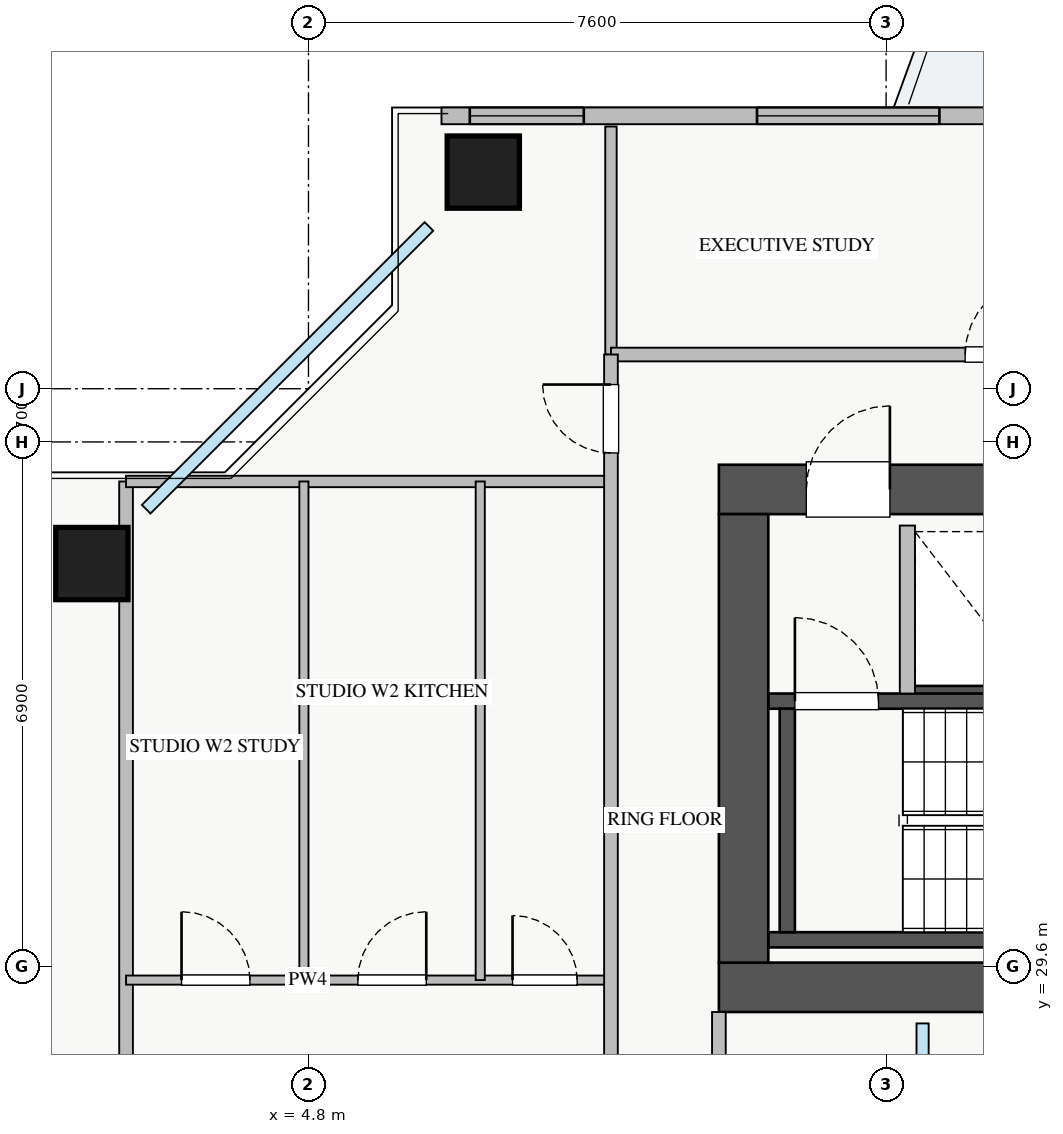
"""IFC4 building model, lengths in metres.
Left out: names, types, materials, properties, quantities, classifications, styles, units other than length and angle.
Written with IfcOpenShell. Run it as: python <this file> out.ifc"""

import sys

from ifc_helpers import new_model, si_unit, direction, frame, frame_2d, origin, origin_2d, place, context, subcontext, project, spatial, rectangle, extrude, source, transform, mapped, element, fill, save


model = new_model("IFC4")
c1 = context("Model", 3, precision=1e-05, world=origin(), true_north=direction((0.0, 1.0)))
c2 = subcontext(c1, "Body", "Model", "MODEL_VIEW")
j1 = project(units=[si_unit("LENGTHUNIT", "METRE"), si_unit("PLANEANGLEUNIT", "RADIAN")], contexts=[c1])
p1 = place(None, origin())
s1 = spatial("IfcSite", under=j1, at=p1, CompositionType="ELEMENT")
p2 = place(p1, origin())
s2 = spatial("IfcBuilding", under=s1, at=p2, CompositionType="ELEMENT")
p3 = place(p2, frame((0.0, 0.0, 173.0)))
s3 = spatial("IfcBuildingStorey", under=s2, at=p3, CompositionType="ELEMENT", Elevation=173.0)
p4 = place(p3, frame((12.68, 33.2, 0.0), z_axis=(0.0, 0.0, 1.0), x_axis=(1.0, 0.0, 0.0)))
e1 = element("IfcWall", 1, at=p4, inside=s3, PredefinedType="SHEAR", context=c2, shape_type="SweptSolid", body=[
    extrude(rectangle(XDim=1.94, YDim=0.18, at=frame_2d((0.97, 0.0))), origin(), (0.0, 0.0, 1.0), 3.0),
])
p5 = place(p3, frame((10.85, 29.95, 0.0), z_axis=(0.0, 0.0, 1.0), x_axis=(1.0, 0.0, 0.0)))
e2 = element("IfcWall", 2, at=p5, inside=s3, PredefinedType="SHEAR", context=c2, shape_type="SweptSolid", body=[
    extrude(rectangle(XDim=7.3, YDim=0.2, at=frame_2d((3.65, 0.0))), origin(), (0.0, 0.0, 1.0), 3.25),
])
p6 = place(p3, frame((10.85, 33.09, 0.0), z_axis=(0.0, 0.0, 1.0), x_axis=(1.0, 0.0, 0.0)))
e3 = element("IfcWall", 3, at=p6, inside=s3, PredefinedType="SHEAR", context=c2, shape_type="SweptSolid", body=[
    extrude(rectangle(XDim=7.3, YDim=0.2, at=frame_2d((3.65, 0.0))), origin(), (0.0, 0.0, 1.0), 3.25),
])
p7 = place(p6, frame((0.35, 0.0, 0.0)))
e4 = element("IfcOpeningElement", 4, at=p7, cuts=e3, PredefinedType="OPENING", context=c2, shape_type="SweptSolid", body=[
    extrude(rectangle(XDim=1.1, YDim=2.05, at=frame_2d((0.55, 1.025))), frame((0.0, 0.11, 0.0), z_axis=(0.0, -1.0, 0.0), x_axis=(1.0, 0.0, 0.0)), (0.0, 0.0, 1.0), 0.22),
])
p8 = place(p3, frame((11.1, 30.05, 0.0), z_axis=(0.0, 0.0, 1.0), x_axis=(0.0, 1.0, 0.0)))
e5 = element("IfcWall", 5, at=p8, inside=s3, PredefinedType="SHEAR", context=c2, shape_type="SweptSolid", body=[
    extrude(rectangle(XDim=2.94, YDim=0.2, at=frame_2d((1.47, 0.0))), origin(), (0.0, 0.0, 1.0), 3.25),
])
p9 = place(p3, frame((10.2, 29.325, 0.0), z_axis=(0.0, 0.0, 1.0), x_axis=(1.0, 0.0, 0.0)))
e6 = element("IfcWall", 6, at=p9, inside=s3, PredefinedType="SHEAR", context=c2, shape_type="SweptSolid", body=[
    extrude(rectangle(XDim=17.6, YDim=0.65, at=frame_2d((8.8, 0.0))), origin(), (0.0, 0.0, 1.0), 3.25),
])
p10 = place(p3, frame((10.2, 35.875, 0.0), z_axis=(0.0, 0.0, 1.0), x_axis=(1.0, 0.0, 0.0)))
e7 = element("IfcWall", 7, at=p10, inside=s3, PredefinedType="SHEAR", context=c2, shape_type="SweptSolid", body=[
    extrude(rectangle(XDim=17.6, YDim=0.65, at=frame_2d((8.8, 0.0))), origin(), (0.0, 0.0, 1.0), 3.25),
])
p11 = place(p10, frame((1.15, 0.0, 0.0)))
e8 = element("IfcOpeningElement", 8, at=p11, cuts=e7, PredefinedType="OPENING", context=c2, shape_type="SweptSolid", body=[
    extrude(rectangle(XDim=1.1, YDim=2.05, at=frame_2d((0.55, 1.025))), frame((0.0, 0.335, 0.0), z_axis=(0.0, -1.0, 0.0), x_axis=(1.0, 0.0, 0.0)), (0.0, 0.0, 1.0), 0.67),
])
p12 = place(p10, frame((8.3, 0.0, 0.0)))
e9 = element("IfcOpeningElement", 9, at=p12, cuts=e7, PredefinedType="OPENING", context=c2, shape_type="SweptSolid", body=[
    extrude(rectangle(XDim=1.1, YDim=2.05, at=frame_2d((0.55, 1.025))), frame((0.0, 0.335, 0.0), z_axis=(0.0, -1.0, 0.0), x_axis=(1.0, 0.0, 0.0)), (0.0, 0.0, 1.0), 0.67),
])
p13 = place(p10, frame((4.9, 0.0, 0.0)))
e10 = element("IfcOpeningElement", 10, at=p13, cuts=e7, PredefinedType="OPENING", context=c2, shape_type="SweptSolid", body=[
    extrude(rectangle(XDim=1.1, YDim=2.05, at=frame_2d((0.55, 1.025))), frame((0.0, 0.335, 0.0), z_axis=(0.0, -1.0, 0.0), x_axis=(1.0, 0.0, 0.0)), (0.0, 0.0, 1.0), 0.67),
])
p14 = place(p10, frame((14.74, 0.0, 0.0)))
e11 = element("IfcOpeningElement", 11, at=p14, cuts=e7, PredefinedType="OPENING", context=c2, shape_type="SweptSolid", body=[
    extrude(rectangle(XDim=1.0, YDim=2.05, at=frame_2d((0.5, 1.025))), frame((0.0, 0.335, 0.0), z_axis=(0.0, -1.0, 0.0), x_axis=(1.0, 0.0, 0.0)), (0.0, 0.0, 1.0), 0.67),
])
p15 = place(p10, frame((10.005, 0.0, 0.0)))
e12 = element("IfcOpeningElement", 12, at=p15, cuts=e7, PredefinedType="OPENING", context=c2, shape_type="SweptSolid", body=[
    extrude(rectangle(XDim=1.0, YDim=2.05, at=frame_2d((0.5, 1.025))), frame((0.0, 0.335, 0.0), z_axis=(0.0, -1.0, 0.0), x_axis=(1.0, 0.0, 0.0)), (0.0, 0.0, 1.0), 0.67),
])
p16 = place(p10, frame((11.55, 0.0, 0.0)))
e13 = element("IfcOpeningElement", 13, at=p16, cuts=e7, PredefinedType="OPENING", context=c2, shape_type="SweptSolid", body=[
    extrude(rectangle(XDim=1.0, YDim=2.05, at=frame_2d((0.5, 1.025))), frame((0.0, 0.335, 0.0), z_axis=(0.0, -1.0, 0.0), x_axis=(1.0, 0.0, 0.0)), (0.0, 0.0, 1.0), 0.67),
])
p17 = place(p10, frame((13.215, 0.0, 0.0)))
e14 = element("IfcOpeningElement", 14, at=p17, cuts=e7, PredefinedType="OPENING", context=c2, shape_type="SweptSolid", body=[
    extrude(rectangle(XDim=1.0, YDim=2.05, at=frame_2d((0.5, 1.025))), frame((0.0, 0.335, 0.0), z_axis=(0.0, -1.0, 0.0), x_axis=(1.0, 0.0, 0.0)), (0.0, 0.0, 1.0), 0.67),
])
p18 = place(p3, frame((10.525, 29.65, 0.0), z_axis=(0.0, 0.0, 1.0), x_axis=(0.0, 1.0, 0.0)))
e15 = element("IfcWall", 15, at=p18, inside=s3, PredefinedType="SHEAR", context=c2, shape_type="SweptSolid", body=[
    extrude(rectangle(XDim=5.9, YDim=0.65, at=frame_2d((2.95, 0.0))), origin(), (0.0, 0.0, 1.0), 3.25),
])
m1 = source(origin(), c2, "Body", "SweptSolid", [
    extrude(rectangle(XDim=0.95, YDim=0.95, at=origin_2d()), origin(), (0.0, 0.0, 1.0), 3.25),
])
for number, where, z_axis, x_axis in (
    (16, (7.1, 40.05, 0.0), (0.0, 0.0, 1.0), (1.0, 0.0, 0.0)),
    (17, (1.95, 34.9, 0.0), (0.0, 0.0, 1.0), (1.0, 0.0, 0.0)),
):
    element("IfcColumn", number, at=place(p3, frame(where, z_axis=z_axis, x_axis=x_axis)), inside=s3, PredefinedType="COLUMN", context=c2, shape_type="MappedRepresentation", body=[
        mapped(m1, transform((0.0, 0.0, 0.0), x_axis=(1.0, 0.0, 0.0), y_axis=(0.0, 1.0, 0.0), z_axis=(0.0, 0.0, 1.0), scale=1.0)),
    ])
p19 = place(p3, frame((6.55, 40.79, 0.0), z_axis=(0.0, 0.0, 1.0), x_axis=(1.0, 0.0, 0.0)))
e18 = element("IfcWall", 18, at=p19, inside=s3, PredefinedType="STANDARD", context=c2, shape_type="SweptSolid", body=[
    extrude(rectangle(XDim=24.9, YDim=0.22, at=frame_2d((12.45, 0.0))), origin(), (0.0, 0.0, 1.0), 2.54),
])
p20 = place(p19, frame((13.3, 0.0, 0.0)))
e19 = element("IfcOpeningElement", 19, at=p20, cuts=e18, PredefinedType="OPENING", context=c2, shape_type="SweptSolid", body=[
    extrude(rectangle(XDim=1.2, YDim=2.1, at=frame_2d((0.6, 1.05))), frame((0.0, 0.12, 0.0), z_axis=(0.0, -1.0, 0.0), x_axis=(1.0, 0.0, 0.0)), (0.0, 0.0, 1.0), 0.24),
])
p21 = place(p19, frame((0.373, 0.0, 0.9)))
e20 = element("IfcOpeningElement", 20, at=p21, cuts=e18, PredefinedType="OPENING", context=c2, shape_type="SweptSolid", body=[
    extrude(rectangle(XDim=1.5, YDim=1.5, at=frame_2d((0.75, 0.75))), frame((0.0, 0.12, 0.0), z_axis=(0.0, -1.0, 0.0), x_axis=(1.0, 0.0, 0.0)), (0.0, 0.0, 1.0), 0.24),
])
p22 = place(p19, frame((8.438, 0.0, 0.9)))
e21 = element("IfcOpeningElement", 21, at=p22, cuts=e18, PredefinedType="OPENING", context=c2, shape_type="SweptSolid", body=[
    extrude(rectangle(XDim=1.8, YDim=1.45, at=frame_2d((0.9, 0.725))), frame((0.0, 0.12, 0.0), z_axis=(0.0, -1.0, 0.0), x_axis=(1.0, 0.0, 0.0)), (0.0, 0.0, 1.0), 0.24),
])
p23 = place(p19, frame((14.813, 0.0, 0.9)))
e22 = element("IfcOpeningElement", 22, at=p23, cuts=e18, PredefinedType="OPENING", context=c2, shape_type="SweptSolid", body=[
    extrude(rectangle(XDim=1.5, YDim=1.45, at=frame_2d((0.75, 0.725))), frame((0.0, 0.12, 0.0), z_axis=(0.0, -1.0, 0.0), x_axis=(1.0, 0.0, 0.0)), (0.0, 0.0, 1.0), 0.24),
])
p24 = place(p19, frame((20.738, 0.0, 0.9)))
e23 = element("IfcOpeningElement", 23, at=p24, cuts=e18, PredefinedType="OPENING", context=c2, shape_type="SweptSolid", body=[
    extrude(rectangle(XDim=2.1, YDim=1.46, at=frame_2d((1.05, 0.73))), frame((0.0, 0.12, 0.0), z_axis=(0.0, -1.0, 0.0), x_axis=(1.0, 0.0, 0.0)), (0.0, 0.0, 1.0), 0.24),
])
p25 = place(p19, frame((4.152, 0.0, 0.9)))
e24 = element("IfcOpeningElement", 24, at=p25, cuts=e18, PredefinedType="OPENING", context=c2, shape_type="SweptSolid", body=[
    extrude(rectangle(XDim=2.4, YDim=1.5, at=frame_2d((1.2, 0.75))), frame((0.0, 0.12, 0.0), z_axis=(0.0, -1.0, 0.0), x_axis=(1.0, 0.0, 0.0)), (0.0, 0.0, 1.0), 0.24),
])
p26 = place(p3, frame((12.68, 33.19, 0.0), z_axis=(0.0, 0.0, 1.0), x_axis=(0.0, 1.0, 0.0)))
e25 = element("IfcWall", 25, at=p26, inside=s3, PredefinedType="PARTITIONING", context=c2, shape_type="SweptSolid", body=[
    extrude(rectangle(XDim=2.21, YDim=0.2, at=frame_2d((1.105, 0.0))), origin(), (0.0, 0.0, 1.0), 3.0),
])
p27 = place(p3, frame((2.4, 10.02, 0.0), z_axis=(0.0, 0.0, 1.0), x_axis=(0.0, 1.0, 0.0)))
e26 = element("IfcWall", 26, at=p27, inside=s3, PredefinedType="PARTITIONING", context=c2, shape_type="SweptSolid", body=[
    extrude(rectangle(XDim=25.96, YDim=0.18, at=frame_2d((12.98, 0.0))), origin(), (0.0, 0.0, 1.0), 3.0),
])
p28 = place(p3, frame((8.78, 37.65, 0.0), z_axis=(0.0, 0.0, 1.0), x_axis=(0.0, 1.0, 0.0)))
e27 = element("IfcWall", 27, at=p28, inside=s3, PredefinedType="PARTITIONING", context=c2, shape_type="SweptSolid", body=[
    extrude(rectangle(XDim=3.0, YDim=0.15, at=frame_2d((1.5, 0.0))), origin(), (0.0, 0.0, 1.0), 3.0),
])
p29 = place(p3, frame((8.78, 37.65, 0.0), z_axis=(0.0, 0.0, 1.0), x_axis=(1.0, 0.0, 0.0)))
e28 = element("IfcWall", 28, at=p29, inside=s3, PredefinedType="PARTITIONING", context=c2, shape_type="SweptSolid", body=[
    extrude(rectangle(XDim=23.54, YDim=0.18, at=frame_2d((11.77, 0.0))), origin(), (0.0, 0.0, 1.0), 3.0),
])
p30 = place(p29, frame((4.66, 0.0, 0.0)))
e29 = element("IfcOpeningElement", 29, at=p30, cuts=e28, PredefinedType="OPENING", context=c2, shape_type="SweptSolid", body=[
    extrude(rectangle(XDim=1.0, YDim=2.05, at=frame_2d((0.5, 1.025))), frame((0.0, 0.1, 0.0), z_axis=(0.0, -1.0, 0.0), x_axis=(1.0, 0.0, 0.0)), (0.0, 0.0, 1.0), 0.2),
])
p31 = place(p29, frame((16.26, 0.0, 0.0)))
e30 = element("IfcOpeningElement", 30, at=p31, cuts=e28, PredefinedType="OPENING", context=c2, shape_type="SweptSolid", body=[
    extrude(rectangle(XDim=1.0, YDim=2.05, at=frame_2d((0.5, 1.025))), frame((0.0, 0.1, 0.0), z_axis=(0.0, -1.0, 0.0), x_axis=(1.0, 0.0, 0.0)), (0.0, 0.0, 1.0), 0.2),
])
p32 = place(p3, frame((2.4, 35.98, 0.0), z_axis=(0.0, 0.0, 1.0), x_axis=(1.0, 0.0, 0.0)))
e31 = element("IfcWall", 31, at=p32, inside=s3, PredefinedType="PARTITIONING", context=c2, shape_type="SweptSolid", body=[
    extrude(rectangle(XDim=6.38, YDim=0.15, at=frame_2d((3.19, 0.0))), origin(), (0.0, 0.0, 1.0), 3.0),
])
p33 = place(p3, frame((2.4, 29.42, 0.0), z_axis=(0.0, 0.0, 1.0), x_axis=(1.0, 0.0, 0.0)))
e32 = element("IfcWall", 32, at=p33, inside=s3, PredefinedType="PLUMBINGWALL", context=c2, shape_type="SweptSolid", body=[
    extrude(rectangle(XDim=6.38, YDim=0.12, at=frame_2d((3.19, 0.0))), origin(), (0.0, 0.0, 1.0), 3.0),
])
p34 = place(p33, frame((0.73, 0.0, 0.0)))
e33 = element("IfcOpeningElement", 33, at=p34, cuts=e32, PredefinedType="OPENING", context=c2, shape_type="SweptSolid", body=[
    extrude(rectangle(XDim=0.9, YDim=2.05, at=frame_2d((0.45, 1.025))), frame((0.0, 0.07, 0.0), z_axis=(0.0, -1.0, 0.0), x_axis=(1.0, 0.0, 0.0)), (0.0, 0.0, 1.0), 0.14),
])
p35 = place(p33, frame((3.05, 0.0, 0.0)))
e34 = element("IfcOpeningElement", 34, at=p35, cuts=e32, PredefinedType="OPENING", context=c2, shape_type="SweptSolid", body=[
    extrude(rectangle(XDim=0.9, YDim=2.05, at=frame_2d((0.45, 1.025))), frame((0.0, 0.07, 0.0), z_axis=(0.0, -1.0, 0.0), x_axis=(1.0, 0.0, 0.0)), (0.0, 0.0, 1.0), 0.14),
])
p36 = place(p33, frame((5.085, 0.0, 0.0)))
e35 = element("IfcOpeningElement", 35, at=p36, cuts=e32, PredefinedType="OPENING", context=c2, shape_type="SweptSolid", body=[
    extrude(rectangle(XDim=0.85, YDim=2.05, at=frame_2d((0.425, 1.025))), frame((0.0, 0.07, 0.0), z_axis=(0.0, -1.0, 0.0), x_axis=(1.0, 0.0, 0.0)), (0.0, 0.0, 1.0), 0.14),
])
p37 = place(p3, frame((4.74, 29.42, 0.0), z_axis=(0.0, 0.0, 1.0), x_axis=(0.0, 1.0, 0.0)))
e36 = element("IfcWall", 36, at=p37, inside=s3, PredefinedType="PLUMBINGWALL", context=c2, shape_type="SweptSolid", body=[
    extrude(rectangle(XDim=6.56, YDim=0.12, at=frame_2d((3.28, 0.0))), origin(), (0.0, 0.0, 1.0), 3.0),
])
p38 = place(p3, frame((7.06, 29.42, 0.0), z_axis=(0.0, 0.0, 1.0), x_axis=(0.0, 1.0, 0.0)))
e37 = element("IfcWall", 37, at=p38, inside=s3, PredefinedType="PLUMBINGWALL", context=c2, shape_type="SweptSolid", body=[
    extrude(rectangle(XDim=6.56, YDim=0.12, at=frame_2d((3.28, 0.0))), origin(), (0.0, 0.0, 1.0), 2.495),
])
p39 = place(p3, frame((8.78, 8.31, 0.0), z_axis=(0.0, 0.0, 1.0), x_axis=(0.0, 1.0, 0.0)))
e38 = element("IfcWall", 38, at=p39, inside=s3, PredefinedType="PARTITIONING", context=c2, shape_type="SweptSolid", body=[
    extrude(rectangle(XDim=29.34, YDim=0.18, at=frame_2d((14.67, 0.0))), origin(), (0.0, 0.0, 1.0), 3.0),
])
p40 = place(p39, frame((28.045, 0.0, 0.0)))
e39 = element("IfcOpeningElement", 39, at=p40, cuts=e38, PredefinedType="OPENING", context=c2, shape_type="SweptSolid", body=[
    extrude(rectangle(XDim=0.9, YDim=2.05, at=frame_2d((0.45, 1.025))), frame((0.0, 0.1, 0.0), z_axis=(0.0, -1.0, 0.0), x_axis=(1.0, 0.0, 0.0)), (0.0, 0.0, 1.0), 0.2),
])
p41 = place(p39, frame((0.24, 0.0, 0.0)))
e40 = element("IfcOpeningElement", 40, at=p41, cuts=e38, PredefinedType="OPENING", context=c2, shape_type="SweptSolid", body=[
    extrude(rectangle(XDim=0.9, YDim=2.05, at=frame_2d((0.45, 1.025))), frame((0.0, 0.1, 0.0), z_axis=(0.0, -1.0, 0.0), x_axis=(1.0, 0.0, 0.0)), (0.0, 0.0, 1.0), 0.2),
])
p42 = place(p39, frame((7.705, 0.0, 0.0)))
e41 = element("IfcOpeningElement", 41, at=p42, cuts=e38, PredefinedType="OPENING", context=c2, shape_type="SweptSolid", body=[
    extrude(rectangle(XDim=1.0, YDim=2.05, at=frame_2d((0.5, 1.025))), frame((0.0, 0.1, 0.0), z_axis=(0.0, -1.0, 0.0), x_axis=(1.0, 0.0, 0.0)), (0.0, 0.0, 1.0), 0.2),
])
p43 = place(p39, frame((17.39, 0.0, 0.0)))
e42 = element("IfcOpeningElement", 42, at=p43, cuts=e38, PredefinedType="OPENING", context=c2, shape_type="SweptSolid", body=[
    extrude(rectangle(XDim=1.0, YDim=2.05, at=frame_2d((0.5, 1.025))), frame((0.0, 0.1, 0.0), z_axis=(0.0, -1.0, 0.0), x_axis=(1.0, 0.0, 0.0)), (0.0, 0.0, 1.0), 0.2),
])
p44 = place(p3, frame((10.2, 17.0, 0.0), z_axis=(0.0, 0.0, 1.0), x_axis=(0.0, 1.0, 0.0)))
e43 = element("IfcWall", 43, at=p44, inside=s3, PredefinedType="PARTITIONING", context=c2, shape_type="SweptSolid", body=[
    extrude(rectangle(XDim=12.0, YDim=0.18, at=frame_2d((6.0, 0.0))), origin(), (0.0, 0.0, 1.0), 3.0),
])
p45 = place(p44, frame((1.5, 0.0, 0.0)))
e44 = element("IfcOpeningElement", 44, at=p45, cuts=e43, PredefinedType="OPENING", context=c2, shape_type="SweptSolid", body=[
    extrude(rectangle(XDim=0.85, YDim=2.05, at=frame_2d((0.425, 1.025))), frame((0.0, 0.1, 0.0), z_axis=(0.0, -1.0, 0.0), x_axis=(1.0, 0.0, 0.0)), (0.0, 0.0, 1.0), 0.2),
])
p46 = place(p44, frame((6.5, 0.0, 0.0)))
e45 = element("IfcOpeningElement", 45, at=p46, cuts=e43, PredefinedType="OPENING", context=c2, shape_type="SweptSolid", body=[
    extrude(rectangle(XDim=1.0, YDim=2.05, at=frame_2d((0.5, 1.025))), frame((0.0, 0.1, 0.0), z_axis=(0.0, -1.0, 0.0), x_axis=(1.0, 0.0, 0.0)), (0.0, 0.0, 1.0), 0.2),
])
m2 = source(origin(), c2, "Body", "SweptSolid", [
    extrude(rectangle(XDim=1.5, YDim=1.5, at=frame_2d((0.75, 0.75))), frame((0.0, 0.03, 0.0), z_axis=(0.0, -1.0, 0.0), x_axis=(1.0, 0.0, 0.0)), (0.0, 0.0, 1.0), 0.06),
])
p47 = place(p21, origin())
e46 = element("IfcWindow", 46, at=p47, inside=s3, PartitioningType="TRIPLE_PANEL_VERTICAL", PredefinedType="WINDOW", context=c2, shape_type="MappedRepresentation", body=[
    mapped(m2, transform((0.0, 0.0, 0.0), x_axis=(1.0, 0.0, 0.0), y_axis=(0.0, 1.0, 0.0), z_axis=(0.0, 0.0, 1.0), scale=1.0)),
])
fill(e20, e46)
m3 = source(origin(), c2, "Body", "SweptSolid", [
    extrude(rectangle(XDim=1.1, YDim=2.05, at=frame_2d((0.55, 1.025))), frame((0.0, 0.025, 0.0), z_axis=(0.0, -1.0, 0.0), x_axis=(1.0, 0.0, 0.0)), (0.0, 0.0, 1.0), 0.05),
])
p48 = place(p11, origin())
e47 = element("IfcDoor", 47, at=p48, inside=s3, OperationType="SINGLE_SWING_RIGHT", PredefinedType="DOOR", context=c2, shape_type="MappedRepresentation", body=[
    mapped(m3, transform((0.0, 0.0, 0.0), x_axis=(1.0, 0.0, 0.0), y_axis=(0.0, 1.0, 0.0), z_axis=(0.0, 0.0, 1.0), scale=1.0)),
])
fill(e8, e47)
p49 = place(p7, origin())
e48 = element("IfcDoor", 48, at=p49, inside=s3, OperationType="SINGLE_SWING_LEFT", PredefinedType="DOOR", context=c2, shape_type="MappedRepresentation", body=[
    mapped(m3, transform((0.0, 0.0, 0.0), x_axis=(1.0, 0.0, 0.0), y_axis=(0.0, 1.0, 0.0), z_axis=(0.0, 0.0, 1.0), scale=1.0)),
])
fill(e4, e48)
m4 = source(origin(), c2, "Body", "SweptSolid", [
    extrude(rectangle(XDim=1.0, YDim=2.05, at=frame_2d((0.5, 1.025))), frame((0.0, 0.025, 0.0), z_axis=(0.0, -1.0, 0.0), x_axis=(1.0, 0.0, 0.0)), (0.0, 0.0, 1.0), 0.05),
])
p50 = place(p30, origin())
e49 = element("IfcDoor", 49, at=p50, inside=s3, OperationType="SINGLE_SWING_RIGHT", PredefinedType="DOOR", context=c2, shape_type="MappedRepresentation", body=[
    mapped(m4, transform((0.0, 0.0, 0.0), x_axis=(1.0, 0.0, 0.0), y_axis=(0.0, 1.0, 0.0), z_axis=(0.0, 0.0, 1.0), scale=1.0)),
])
fill(e29, e49)
m5 = source(origin(), c2, "Body", "SweptSolid", [
    extrude(rectangle(XDim=0.9, YDim=2.05, at=frame_2d((0.45, 1.025))), frame((0.0, 0.025, 0.0), z_axis=(0.0, -1.0, 0.0), x_axis=(1.0, 0.0, 0.0)), (0.0, 0.0, 1.0), 0.05),
])
p51 = place(p34, origin())
e50 = element("IfcDoor", 50, at=p51, inside=s3, OperationType="SINGLE_SWING_LEFT", PredefinedType="DOOR", context=c2, shape_type="MappedRepresentation", body=[
    mapped(m5, transform((0.0, 0.0, 0.0), x_axis=(1.0, 0.0, 0.0), y_axis=(0.0, 1.0, 0.0), z_axis=(0.0, 0.0, 1.0), scale=1.0)),
])
fill(e33, e50)
p52 = place(p35, origin())
e51 = element("IfcDoor", 51, at=p52, inside=s3, OperationType="SINGLE_SWING_RIGHT", PredefinedType="DOOR", context=c2, shape_type="MappedRepresentation", body=[
    mapped(m5, transform((0.0, 0.0, 0.0), x_axis=(1.0, 0.0, 0.0), y_axis=(0.0, 1.0, 0.0), z_axis=(0.0, 0.0, 1.0), scale=1.0)),
])
fill(e34, e51)
m6 = source(origin(), c2, "Body", "SweptSolid", [
    extrude(rectangle(XDim=0.85, YDim=2.05, at=frame_2d((0.425, 1.025))), frame((0.0, 0.025, 0.0), z_axis=(0.0, -1.0, 0.0), x_axis=(1.0, 0.0, 0.0)), (0.0, 0.0, 1.0), 0.05),
])
p53 = place(p36, origin())
e52 = element("IfcDoor", 52, at=p53, inside=s3, OperationType="SINGLE_SWING_LEFT", PredefinedType="DOOR", context=c2, shape_type="MappedRepresentation", body=[
    mapped(m6, transform((0.0, 0.0, 0.0), x_axis=(1.0, 0.0, 0.0), y_axis=(0.0, 1.0, 0.0), z_axis=(0.0, 0.0, 1.0), scale=1.0)),
])
fill(e35, e52)
p54 = place(p40, origin())
e53 = element("IfcDoor", 53, at=p54, inside=s3, OperationType="SINGLE_SWING_RIGHT", PredefinedType="DOOR", context=c2, shape_type="MappedRepresentation", body=[
    mapped(m5, transform((0.0, 0.0, 0.0), x_axis=(1.0, 0.0, 0.0), y_axis=(0.0, 1.0, 0.0), z_axis=(0.0, 0.0, 1.0), scale=1.0)),
])
fill(e39, e53)
m7 = source(origin(), c2, "Body", "SweptSolid", [
    extrude(rectangle(XDim=2.4, YDim=1.5, at=frame_2d((1.2, 0.75))), frame((0.0, 0.03, 0.0), z_axis=(0.0, -1.0, 0.0), x_axis=(1.0, 0.0, 0.0)), (0.0, 0.0, 1.0), 0.06),
])
p55 = place(p25, origin())
e54 = element("IfcWindow", 54, at=p55, inside=s3, PartitioningType="TRIPLE_PANEL_VERTICAL", PredefinedType="WINDOW", context=c2, shape_type="MappedRepresentation", body=[
    mapped(m7, transform((0.0, 0.0, 0.0), x_axis=(1.0, 0.0, 0.0), y_axis=(0.0, 1.0, 0.0), z_axis=(0.0, 0.0, 1.0), scale=1.0)),
])
fill(e24, e54)
save(model, sys.argv[1])
